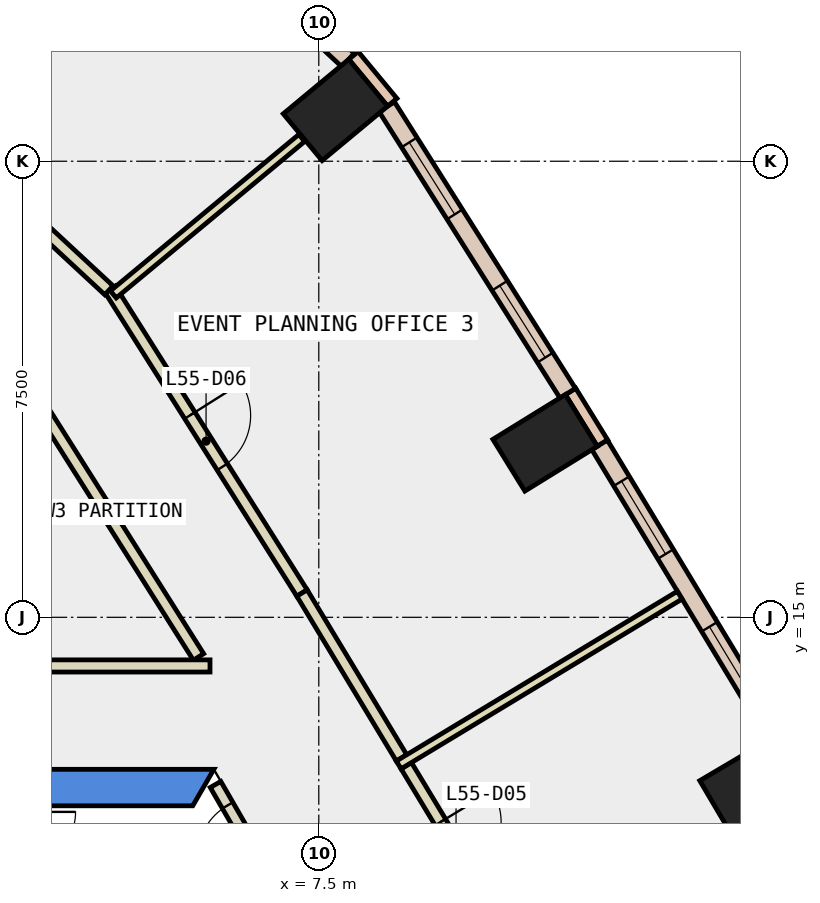
"""IFC4 building model, lengths in metres.
Left out: names, types, materials, properties, quantities, classifications, styles, units other than length and angle.
Written with IfcOpenShell. Run it as: python <this file> out.ifc"""

import sys

from ifc_helpers import new_model, si_unit, direction, frame, frame_2d, origin, origin_2d, place, context, subcontext, project, spatial, polyline, rectangle, outline, extrude, element, fill, save


model = new_model("IFC4")
c1 = context("Model", 3, precision=1e-05, world=origin(), true_north=direction((0.0, 1.0)))
c2 = subcontext(c1, "Body", "Model", "MODEL_VIEW")
j1 = project(units=[si_unit("LENGTHUNIT", "METRE"), si_unit("PLANEANGLEUNIT", "RADIAN")], contexts=[c1])
p1 = place(None, origin())
s1 = spatial("IfcSite", under=j1, at=p1, CompositionType="ELEMENT")
p2 = place(p1, origin())
s2 = spatial("IfcBuilding", under=s1, at=p2, CompositionType="ELEMENT")
p3 = place(p2, frame((0.0, 0.0, 245.0)))
s3 = spatial("IfcBuildingStorey", under=s2, at=p3, CompositionType="ELEMENT", Elevation=245.0)
for number, where, z_axis, x_axis in (
    (1, (14.623, 12.239, -0.34), (0.0, 0.0, 1.0), (-0.509, 0.861, 0.0)),
    (2, (11.222, 17.869, -0.34), (0.0, 0.0, 1.0), (-0.526, 0.851, 0.0)),
    (3, (7.774, 23.343, -0.34), (0.0, 0.0, 1.0), (-0.639, 0.769, 0.0)),
):
    element("IfcColumn", number, at=place(p3, frame(where, z_axis=z_axis, x_axis=x_axis)), inside=s3, PredefinedType="COLUMN", context=c2, shape_type="SweptSolid", body=[
        extrude(rectangle(XDim=1.0, YDim=1.4, at=origin_2d()), origin(), (0.0, 0.0, 1.0), 3.6),
    ])
p4 = place(p3, frame((0.0, 0.0, -0.34)))
e4 = element("IfcWall", 4, at=p4, inside=s3, PredefinedType="SHEAR", context=c2, shape_type="SweptSolid", body=[
    extrude(outline(polyline([(5.774, 12.5), (-5.774, 12.5), (-5.427, 11.9), (5.427, 11.9), (5.774, 12.5)])), origin(), (0.0, 0.0, 1.0), 3.6),
])
p5 = place(p3, frame((12.166, 17.864, 0.0), z_axis=(0.0, 0.0, 1.0), x_axis=(-0.525825307325, 0.850592585306, 0.0)))
e5 = element("IfcWall", 5, at=p5, inside=s3, PredefinedType="STANDARD", context=c2, shape_type="SweptSolid", body=[
    extrude(rectangle(XDim=1.0, YDim=0.2, at=frame_2d((0.5, 0.0))), origin(), (0.0, 0.0, 1.0), 3.26),
])
p6 = place(p3, frame((8.708, 23.469, 0.0), z_axis=(0.0, 0.0, 1.0), x_axis=(-0.637972365578, 0.770059257953, 0.0)))
e6 = element("IfcWall", 6, at=p6, inside=s3, PredefinedType="STANDARD", context=c2, shape_type="SweptSolid", body=[
    extrude(rectangle(XDim=1.0, YDim=0.2, at=frame_2d((0.5, 0.0))), origin(), (0.0, 0.0, 1.0), 3.26),
])
p7 = place(p3, frame((15.011, 13.048, 0.0), z_axis=(0.0, 0.0, 1.0), x_axis=(-0.517169592475, 0.855882943293, 0.0)))
e7 = element("IfcWall", 7, at=p7, inside=s3, PredefinedType="STANDARD", context=c2, shape_type="SweptSolid", body=[
    extrude(rectangle(XDim=5.594, YDim=0.3, at=frame_2d((2.797, 0.0))), origin(), (0.0, 0.0, 1.0), 3.26),
])
p8 = place(p7, frame((0.699, 0.0, 0.9)))
e8 = element("IfcOpeningElement", 8, at=p8, cuts=e7, PredefinedType="OPENING", context=c2, shape_type="SweptSolid", body=[
    extrude(rectangle(XDim=1.4, YDim=2.0, at=frame_2d((0.7, 1.0))), frame((0.0, 0.16, 0.0), z_axis=(0.0, -1.0, 0.0), x_axis=(1.0, 0.0, 0.0)), (0.0, 0.0, 1.0), 0.32),
])
p9 = place(p7, frame((3.496, 0.0, 0.9)))
e9 = element("IfcOpeningElement", 9, at=p9, cuts=e7, PredefinedType="OPENING", context=c2, shape_type="SweptSolid", body=[
    extrude(rectangle(XDim=1.4, YDim=2.0, at=frame_2d((0.7, 1.0))), frame((0.0, 0.16, 0.0), z_axis=(0.0, -1.0, 0.0), x_axis=(1.0, 0.0, 0.0)), (0.0, 0.0, 1.0), 0.32),
])
p10 = place(p3, frame((11.594, 18.685, 0.0), z_axis=(0.0, 0.0, 1.0), x_axis=(-0.534088597203, 0.845428512849, 0.0)))
e10 = element("IfcWall", 10, at=p10, inside=s3, PredefinedType="STANDARD", context=c2, shape_type="SweptSolid", body=[
    extrude(rectangle(XDim=5.572, YDim=0.3, at=frame_2d((2.786, 0.0))), origin(), (0.0, 0.0, 1.0), 3.26),
])
p11 = place(p10, frame((0.693, 0.0, 0.9)))
e11 = element("IfcOpeningElement", 11, at=p11, cuts=e10, PredefinedType="OPENING", context=c2, shape_type="SweptSolid", body=[
    extrude(rectangle(XDim=1.4, YDim=2.0, at=frame_2d((0.7, 1.0))), frame((0.0, 0.16, 0.0), z_axis=(0.0, -1.0, 0.0), x_axis=(1.0, 0.0, 0.0)), (0.0, 0.0, 1.0), 0.32),
])
p12 = place(p10, frame((3.479, 0.0, 0.9)))
e12 = element("IfcOpeningElement", 12, at=p12, cuts=e10, PredefinedType="OPENING", context=c2, shape_type="SweptSolid", body=[
    extrude(rectangle(XDim=1.4, YDim=2.0, at=frame_2d((0.7, 1.0))), frame((0.0, 0.16, 0.0), z_axis=(0.0, -1.0, 0.0), x_axis=(1.0, 0.0, 0.0)), (0.0, 0.0, 1.0), 0.32),
])
p13 = place(p3, frame((7.981, 24.164, 0.0), z_axis=(0.0, 0.0, 1.0), x_axis=(-0.733038780179, 0.680186846942, 0.0)))
e13 = element("IfcWall", 13, at=p13, inside=s3, PredefinedType="STANDARD", context=c2, shape_type="SweptSolid", body=[
    extrude(rectangle(XDim=3.899, YDim=0.3, at=frame_2d((1.949, 0.0))), origin(), (0.0, 0.0, 1.0), 3.26),
])
p14 = place(p13, frame((1.249, 0.0, 0.9)))
e14 = element("IfcOpeningElement", 14, at=p14, cuts=e13, PredefinedType="OPENING", context=c2, shape_type="SweptSolid", body=[
    extrude(rectangle(XDim=1.4, YDim=2.0, at=frame_2d((0.7, 1.0))), frame((0.0, 0.16, 0.0), z_axis=(0.0, -1.0, 0.0), x_axis=(1.0, 0.0, 0.0)), (0.0, 0.0, 1.0), 0.32),
])
p15 = place(p3, frame((5.522, 14.348, 0.0), z_axis=(0.0, 0.0, 1.0), x_axis=(-0.534090914267, 0.845427049069, 0.0)))
e15 = element("IfcWall", 15, at=p15, inside=s3, PredefinedType="PARTITIONING", context=c2, shape_type="SweptSolid", body=[
    extrude(rectangle(XDim=5.628, YDim=0.2, at=frame_2d((2.814, 0.0))), origin(), (0.0, 0.0, 1.0), 3.26),
])
p16 = place(p3, frame((8.939, 12.559, 0.0), z_axis=(0.0, 0.0, 1.0), x_axis=(0.517045022441, -0.855958202699, 0.0)))
e16 = element("IfcWall", 16, at=p16, inside=s3, PredefinedType="PARTITIONING", context=c2, shape_type="SweptSolid", body=[
    extrude(rectangle(XDim=3.166, YDim=0.2, at=frame_2d((1.583, 0.0))), origin(), (0.0, 0.0, 1.0), 3.26),
])
p17 = place(p16, frame((1.083, 0.0, 0.0)))
e17 = element("IfcOpeningElement", 17, at=p17, cuts=e16, PredefinedType="OPENING", context=c2, shape_type="SweptSolid", body=[
    extrude(rectangle(XDim=1.0, YDim=2.1, at=frame_2d((0.5, 1.05))), frame((0.0, 0.11, 0.0), z_axis=(0.0, -1.0, 0.0), x_axis=(1.0, 0.0, 0.0)), (0.0, 0.0, 1.0), 0.22),
])
p18 = place(p3, frame((4.068, 20.395, 0.0), z_axis=(0.0, 0.0, 1.0), x_axis=(0.534062936615, -0.845444723051, 0.0)))
e18 = element("IfcWall", 18, at=p18, inside=s3, PredefinedType="PARTITIONING", context=c2, shape_type="SweptSolid", body=[
    extrude(rectangle(XDim=5.909, YDim=0.2, at=frame_2d((2.955, 0.0))), origin(), (0.0, 0.0, 1.0), 3.26),
])
p19 = place(p18, frame((2.455, 0.0, 0.0)))
e19 = element("IfcOpeningElement", 19, at=p19, cuts=e18, PredefinedType="OPENING", context=c2, shape_type="SweptSolid", body=[
    extrude(rectangle(XDim=1.0, YDim=2.1, at=frame_2d((0.5, 1.05))), frame((0.0, 0.11, 0.0), z_axis=(0.0, -1.0, 0.0), x_axis=(1.0, 0.0, 0.0)), (0.0, 0.0, 1.0), 0.22),
])
p20 = place(p3, frame((7.224, 15.399, 0.0), z_axis=(0.0, 0.0, 1.0), x_axis=(0.51690854001, -0.856040630615, 0.0)))
e20 = element("IfcWall", 20, at=p20, inside=s3, PredefinedType="PARTITIONING", context=c2, shape_type="SweptSolid", body=[
    extrude(rectangle(XDim=3.167, YDim=0.2, at=frame_2d((1.583, 0.0))), origin(), (0.0, 0.0, 1.0), 3.26),
])
p21 = place(p3, frame((1.983, 22.295, 0.0), z_axis=(0.0, 0.0, 1.0), x_axis=(0.732913830966, -0.680321480169, 0.0)))
e21 = element("IfcWall", 21, at=p21, inside=s3, PredefinedType="PARTITIONING", context=c2, shape_type="SweptSolid", body=[
    extrude(rectangle(XDim=2.818, YDim=0.2, at=frame_2d((1.409, 0.0))), origin(), (0.0, 0.0, 1.0), 3.26),
])
p22 = place(p3, frame((8.814, 12.572, 0.0), z_axis=(0.0, 0.0, 1.0), x_axis=(0.855957229262, 0.517046633945, 0.0)))
e22 = element("IfcWall", 22, at=p22, inside=s3, PredefinedType="PARTITIONING", context=c2, shape_type="SweptSolid", body=[
    extrude(rectangle(XDim=5.4, YDim=0.15, at=frame_2d((2.7, 0.0))), origin(), (0.0, 0.0, 1.0), 3.26),
])
p23 = place(p3, frame((4.121, 20.31, 0.0), z_axis=(0.0, 0.0, 1.0), x_axis=(0.769367727798, 0.638806151679, 0.0)))
e23 = element("IfcWall", 23, at=p23, inside=s3, PredefinedType="PARTITIONING", context=c2, shape_type="SweptSolid", body=[
    extrude(rectangle(XDim=4.028, YDim=0.15, at=frame_2d((2.014, 0.0))), origin(), (0.0, 0.0, 1.0), 3.26),
])
p24 = place(p3, frame((6.699, 10.697, 0.0), z_axis=(0.0, 0.0, 1.0), x_axis=(-0.499914839587, 0.866074565589, 0.0)))
e24 = element("IfcWall", 24, at=p24, inside=s3, PredefinedType="PARTITIONING", context=c2, shape_type="SweptSolid", body=[
    extrude(rectangle(XDim=1.794, YDim=0.2, at=frame_2d((0.897, 0.0))), origin(), (0.0, 0.0, 1.0), 2.4),
])
p25 = place(p24, frame((0.397, 0.0, 0.0)))
e25 = element("IfcOpeningElement", 25, at=p25, cuts=e24, PredefinedType="OPENING", context=c2, shape_type="SweptSolid", body=[
    extrude(rectangle(XDim=1.0, YDim=2.1, at=frame_2d((0.5, 1.05))), frame((0.0, 0.11, 0.0), z_axis=(0.0, -1.0, 0.0), x_axis=(1.0, 0.0, 0.0)), (0.0, 0.0, 1.0), 0.22),
])
p26 = place(p3, frame((0.4, 14.2, 0.0), z_axis=(0.0, 0.0, 1.0), x_axis=(1.0, 0.0, 0.0)))
e26 = element("IfcWall", 26, at=p26, inside=s3, PredefinedType="PARTITIONING", context=c2, shape_type="SweptSolid", body=[
    extrude(rectangle(XDim=5.311, YDim=0.2, at=frame_2d((2.656, 0.0))), origin(), (0.0, 0.0, 1.0), 3.26),
])
p27 = place(p26, frame((0.827, 0.0, 0.0)))
e27 = element("IfcOpeningElement", 27, at=p27, cuts=e26, PredefinedType="OPENING", context=c2, shape_type="SweptSolid", body=[
    extrude(rectangle(XDim=1.8, YDim=2.1, at=frame_2d((0.9, 1.05))), frame((0.0, 0.11, 0.0), z_axis=(0.0, -1.0, 0.0), x_axis=(1.0, 0.0, 0.0)), (0.0, 0.0, 1.0), 0.22),
])
p28 = place(p8, origin())
e28 = element("IfcWindow", 28, at=p28, inside=s3, PartitioningType="SINGLE_PANEL", PredefinedType="WINDOW", context=c2, shape_type="SweptSolid", body=[
    extrude(rectangle(XDim=1.4, YDim=2.0, at=frame_2d((0.7, 1.0))), frame((0.0, 0.03, 0.0), z_axis=(0.0, -1.0, 0.0), x_axis=(1.0, 0.0, 0.0)), (0.0, 0.0, 1.0), 0.06),
])
fill(e8, e28)
p29 = place(p9, origin())
e29 = element("IfcWindow", 29, at=p29, inside=s3, PartitioningType="SINGLE_PANEL", PredefinedType="WINDOW", context=c2, shape_type="SweptSolid", body=[
    extrude(rectangle(XDim=1.4, YDim=2.0, at=frame_2d((0.7, 1.0))), frame((0.0, 0.03, 0.0), z_axis=(0.0, -1.0, 0.0), x_axis=(1.0, 0.0, 0.0)), (0.0, 0.0, 1.0), 0.06),
])
fill(e9, e29)
p30 = place(p11, origin())
e30 = element("IfcWindow", 30, at=p30, inside=s3, PartitioningType="SINGLE_PANEL", PredefinedType="WINDOW", context=c2, shape_type="SweptSolid", body=[
    extrude(rectangle(XDim=1.4, YDim=2.0, at=frame_2d((0.7, 1.0))), frame((0.0, 0.03, 0.0), z_axis=(0.0, -1.0, 0.0), x_axis=(1.0, 0.0, 0.0)), (0.0, 0.0, 1.0), 0.06),
])
fill(e11, e30)
p31 = place(p12, origin())
e31 = element("IfcWindow", 31, at=p31, inside=s3, PartitioningType="SINGLE_PANEL", PredefinedType="WINDOW", context=c2, shape_type="SweptSolid", body=[
    extrude(rectangle(XDim=1.4, YDim=2.0, at=frame_2d((0.7, 1.0))), frame((0.0, 0.03, 0.0), z_axis=(0.0, -1.0, 0.0), x_axis=(1.0, 0.0, 0.0)), (0.0, 0.0, 1.0), 0.06),
])
fill(e12, e31)
p32 = place(p17, origin())
e32 = element("IfcDoor", 32, at=p32, inside=s3, OperationType="SINGLE_SWING_LEFT", PredefinedType="DOOR", context=c2, shape_type="SweptSolid", body=[
    extrude(rectangle(XDim=1.0, YDim=2.1, at=frame_2d((0.5, 1.05))), frame((0.0, 0.025, 0.0), z_axis=(0.0, -1.0, 0.0), x_axis=(1.0, 0.0, 0.0)), (0.0, 0.0, 1.0), 0.05),
])
fill(e17, e32)
p33 = place(p19, origin())
e33 = element("IfcDoor", 33, at=p33, inside=s3, OperationType="SINGLE_SWING_LEFT", PredefinedType="DOOR", context=c2, shape_type="SweptSolid", body=[
    extrude(rectangle(XDim=1.0, YDim=2.1, at=frame_2d((0.5, 1.05))), frame((0.0, 0.025, 0.0), z_axis=(0.0, -1.0, 0.0), x_axis=(1.0, 0.0, 0.0)), (0.0, 0.0, 1.0), 0.05),
])
fill(e19, e33)
p34 = place(p25, origin())
e34 = element("IfcDoor", 34, at=p34, inside=s3, OperationType="SINGLE_SWING_LEFT", PredefinedType="DOOR", context=c2, shape_type="SweptSolid", body=[
    extrude(rectangle(XDim=1.0, YDim=2.1, at=frame_2d((0.5, 1.05))), frame((0.0, 0.025, 0.0), z_axis=(0.0, -1.0, 0.0), x_axis=(1.0, 0.0, 0.0)), (0.0, 0.0, 1.0), 0.05),
])
fill(e25, e34)
save(model, sys.argv[1])
